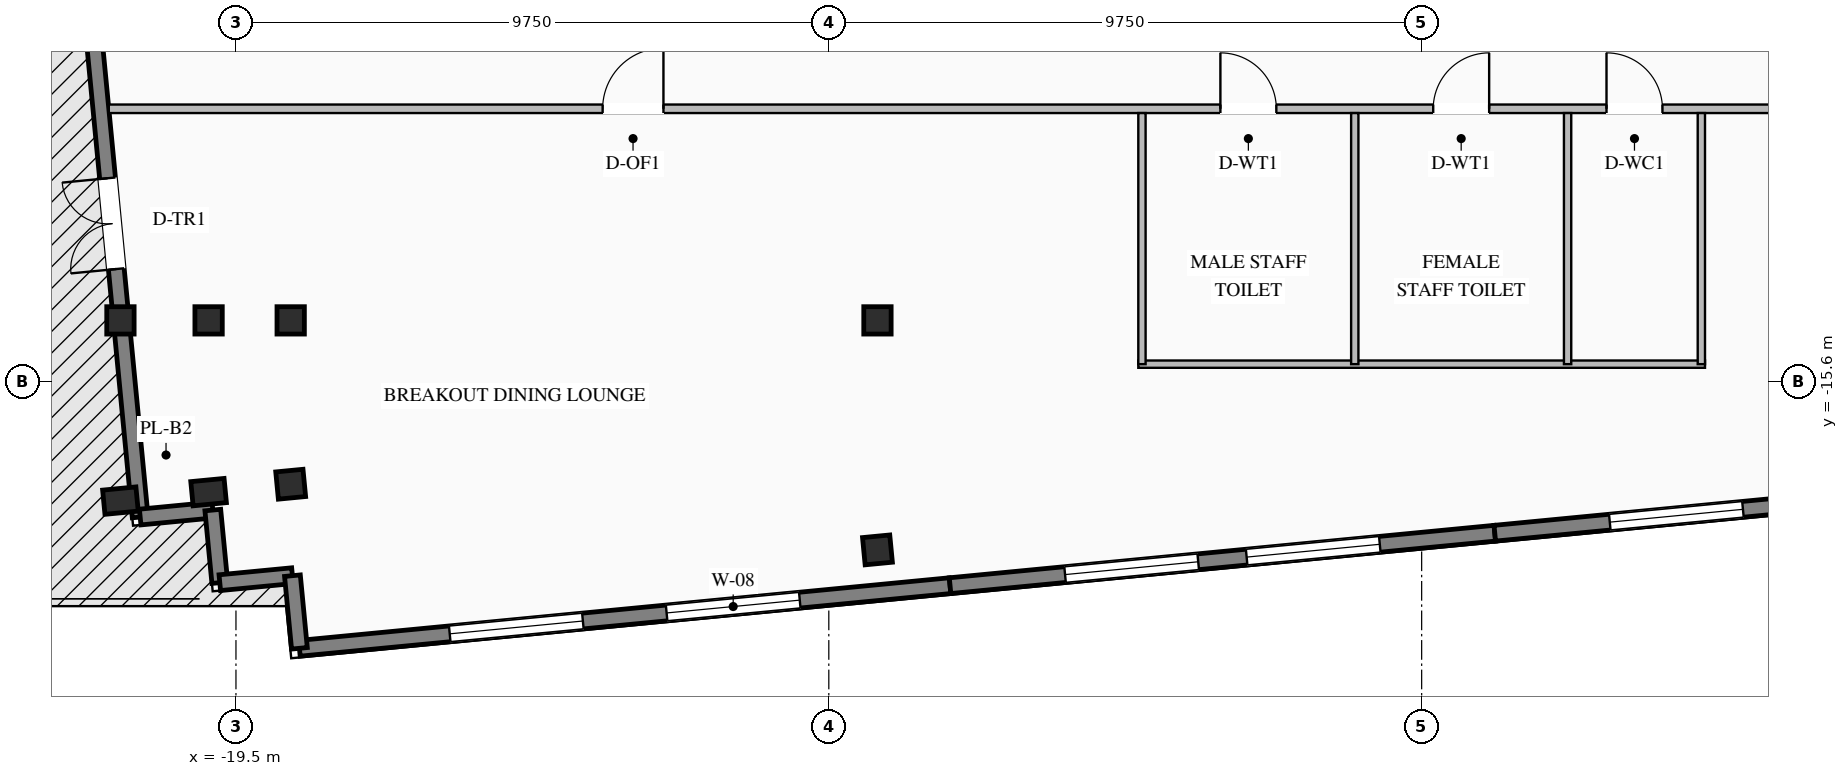
"""IFC4 building model, lengths in metres.
Left out: names, types, materials, properties, quantities, classifications, styles, units other than length and angle.
Written with IfcOpenShell. Run it as: python <this file> out.ifc"""

import sys

from ifc_helpers import new_model, si_unit, direction, frame, frame_2d, origin, origin_2d, place, context, subcontext, project, spatial, rectangle, i_section, extrude, element, fill, save


model = new_model("IFC4")
c1 = context("Model", 3, precision=1e-05, world=origin(), true_north=direction((0.0, 1.0)))
c2 = subcontext(c1, "Body", "Model", "MODEL_VIEW")
j1 = project(units=[si_unit("LENGTHUNIT", "METRE"), si_unit("PLANEANGLEUNIT", "RADIAN")], contexts=[c1])
p1 = place(None, origin())
s1 = spatial("IfcSite", under=j1, at=p1, CompositionType="ELEMENT")
p2 = place(p1, origin())
s2 = spatial("IfcBuilding", under=s1, at=p2, CompositionType="ELEMENT")
p3 = place(p2, frame((0.0, 0.0, 247.5)))
s3 = spatial("IfcBuildingStorey", under=s2, at=p3, CompositionType="ELEMENT", Elevation=247.5)
for number, where, z_axis, x_axis in (
    (1, (-21.4, -14.6, 0.0), (0.0, 0.0, 1.0), (1.0, 0.0, 0.0)),
    (2, (-19.95, -14.6, 0.0), (0.0, 0.0, 1.0), (1.0, 0.0, 0.0)),
    (3, (-18.6, -14.6, 0.0), (0.0, 0.0, 1.0), (1.0, 0.0, 0.0)),
    (4, (-8.95, -14.6, 0.0), (0.0, 0.0, 1.0), (1.0, 0.0, 0.0)),
):
    element("IfcColumn", number, at=place(p3, frame(where, z_axis=z_axis, x_axis=x_axis)), inside=s3, PredefinedType="COLUMN", context=c2, shape_type="SweptSolid", body=[
        extrude(i_section(OverallWidth=0.45, OverallDepth=0.45, WebThickness=0.022, FlangeThickness=0.032, at=origin_2d()), origin(), (0.0, 0.0, 1.0), 4.2),
    ])
p4 = place(p3, frame((-18.6, -17.295, -0.28), z_axis=(0.0, 0.0, 1.0), x_axis=(0.995396198367, 0.09584575252, 0.0)))
e5 = element("IfcColumn", 5, at=p4, inside=s3, PredefinedType="COLUMN", context=c2, shape_type="SweptSolid", body=[
    extrude(i_section(OverallWidth=0.45, OverallDepth=0.45, WebThickness=0.022, FlangeThickness=0.032, at=origin_2d()), origin(), (0.0, 0.0, 1.0), 4.48),
])
p5 = place(p3, frame((-8.95, -18.375, 0.0), z_axis=(0.0, 0.0, 1.0), x_axis=(0.995396198367, 0.09584575252, 0.0)))
e6 = element("IfcColumn", 6, at=p5, inside=s3, PredefinedType="COLUMN", context=c2, shape_type="SweptSolid", body=[
    extrude(i_section(OverallWidth=0.45, OverallDepth=0.45, WebThickness=0.022, FlangeThickness=0.032, at=origin_2d()), origin(), (0.0, 0.0, 1.0), 4.2),
])
for number, where, z_axis, x_axis in (
    (7, (-21.4, -17.564, 0.0), (0.0, 0.0, 1.0), (0.995, 0.096, 0.0)),
    (8, (-19.95, -17.425, 0.0), (0.0, 0.0, 1.0), (0.995, 0.096, 0.0)),
):
    element("IfcColumn", number, at=place(p3, frame(where, z_axis=z_axis, x_axis=x_axis)), inside=s3, PredefinedType="PILASTER", context=c2, shape_type="SweptSolid", body=[
        extrude(rectangle(XDim=0.55, YDim=0.4, at=origin_2d()), origin(), (0.0, 0.0, 1.0), 4.2),
    ])
p6 = place(p3, frame((-7.756, -18.963, 0.0), z_axis=(0.0, 0.0, 1.0), x_axis=(-0.995396745868, -0.095840066339, 0.0)))
e9 = element("IfcWall", 9, at=p6, inside=s3, PredefinedType="STANDARD", context=c2, shape_type="SweptSolid", body=[
    extrude(rectangle(XDim=10.75, YDim=0.26, at=frame_2d((5.375, 0.0))), origin(), (0.0, 0.0, 1.0), 4.0),
])
p7 = place(p6, frame((2.483, 0.0, 0.76)))
e10 = element("IfcOpeningElement", 10, at=p7, cuts=e9, PredefinedType="OPENING", context=c2, shape_type="SweptSolid", body=[
    extrude(rectangle(XDim=2.2, YDim=2.25, at=frame_2d((1.1, 1.125))), frame((0.0, 0.14, 0.0), z_axis=(0.0, -1.0, 0.0), x_axis=(1.0, 0.0, 0.0)), (0.0, 0.0, 1.0), 0.28),
])
p8 = place(p6, frame((6.067, 0.0, 0.76)))
e11 = element("IfcOpeningElement", 11, at=p8, cuts=e9, PredefinedType="OPENING", context=c2, shape_type="SweptSolid", body=[
    extrude(rectangle(XDim=2.2, YDim=2.25, at=frame_2d((1.1, 1.125))), frame((0.0, 0.14, 0.0), z_axis=(0.0, -1.0, 0.0), x_axis=(1.0, 0.0, 0.0)), (0.0, 0.0, 1.0), 0.28),
])
p9 = place(p3, frame((1.203, -18.101, 0.0), z_axis=(0.0, 0.0, 1.0), x_axis=(-0.995397043619, -0.095836973841, 0.0)))
e12 = element("IfcWall", 12, at=p9, inside=s3, PredefinedType="STANDARD", context=c2, shape_type="SweptSolid", body=[
    extrude(rectangle(XDim=9.0, YDim=0.26, at=frame_2d((4.5, 0.0))), origin(), (0.0, 0.0, 1.0), 4.0),
])
p10 = place(p9, frame((1.9, 0.0, 0.76)))
e13 = element("IfcOpeningElement", 13, at=p10, cuts=e12, PredefinedType="OPENING", context=c2, shape_type="SweptSolid", body=[
    extrude(rectangle(XDim=2.2, YDim=2.25, at=frame_2d((1.1, 1.125))), frame((0.0, 0.14, 0.0), z_axis=(0.0, -1.0, 0.0), x_axis=(1.0, 0.0, 0.0)), (0.0, 0.0, 1.0), 0.28),
])
p11 = place(p9, frame((4.9, 0.0, 0.76)))
e14 = element("IfcOpeningElement", 14, at=p11, cuts=e12, PredefinedType="OPENING", context=c2, shape_type="SweptSolid", body=[
    extrude(rectangle(XDim=2.2, YDim=2.25, at=frame_2d((1.1, 1.125))), frame((0.0, 0.14, 0.0), z_axis=(0.0, -1.0, 0.0), x_axis=(1.0, 0.0, 0.0)), (0.0, 0.0, 1.0), 0.28),
])
p12 = place(p3, frame((10.161, -17.238, 0.0), z_axis=(0.0, 0.0, 1.0), x_axis=(-0.995394206237, -0.095866439332, 0.0)))
e15 = element("IfcWall", 15, at=p12, inside=s3, PredefinedType="STANDARD", context=c2, shape_type="SweptSolid", body=[
    extrude(rectangle(XDim=9.0, YDim=0.26, at=frame_2d((4.5, 0.0))), origin(), (0.0, 0.0, 1.0), 4.0),
])
p13 = place(p12, frame((1.9, 0.0, 0.76)))
e16 = element("IfcOpeningElement", 16, at=p13, cuts=e15, PredefinedType="OPENING", context=c2, shape_type="SweptSolid", body=[
    extrude(rectangle(XDim=2.2, YDim=2.25, at=frame_2d((1.1, 1.125))), frame((0.0, 0.14, 0.0), z_axis=(0.0, -1.0, 0.0), x_axis=(1.0, 0.0, 0.0)), (0.0, 0.0, 1.0), 0.28),
])
p14 = place(p12, frame((4.9, 0.0, 0.76)))
e17 = element("IfcOpeningElement", 17, at=p14, cuts=e15, PredefinedType="OPENING", context=c2, shape_type="SweptSolid", body=[
    extrude(rectangle(XDim=2.2, YDim=2.25, at=frame_2d((1.1, 1.125))), frame((0.0, 0.14, 0.0), z_axis=(0.0, -1.0, 0.0), x_axis=(1.0, 0.0, 0.0)), (0.0, 0.0, 1.0), 0.28),
])
p15 = place(p3, frame((-21.075, -17.834, 0.0), z_axis=(0.0, 0.0, 1.0), x_axis=(-0.095852427869, 0.995395555582, 0.0)))
e18 = element("IfcWall", 18, at=p15, inside=s3, PredefinedType="STANDARD", context=c2, shape_type="SweptSolid", body=[
    extrude(rectangle(XDim=15.15, YDim=0.26, at=frame_2d((7.575, 0.0))), origin(), (0.0, 0.0, 1.0), 2.795),
])
p16 = place(p15, frame((4.098, 0.0, 0.0)))
e19 = element("IfcOpeningElement", 19, at=p16, cuts=e18, PredefinedType="OPENING", context=c2, shape_type="SweptSolid", body=[
    extrude(rectangle(XDim=1.5, YDim=2.15, at=frame_2d((0.75, 1.075))), frame((0.0, 0.14, 0.0), z_axis=(0.0, -1.0, 0.0), x_axis=(1.0, 0.0, 0.0)), (0.0, 0.0, 1.0), 0.28),
])
p17 = place(p3, frame((-21.075, -17.834, 0.0), z_axis=(0.0, 0.0, 1.0), x_axis=(0.995397091755, 0.095836473879, 0.0)))
e20 = element("IfcWall", 20, at=p17, inside=s3, PredefinedType="STANDARD", context=c2, shape_type="SweptSolid", body=[
    extrude(rectangle(XDim=1.2, YDim=0.26, at=frame_2d((0.6, 0.0))), origin(), (0.0, 0.0, 1.0), 2.795),
])
for number, where, z_axis, x_axis in (
    (21, (-19.881, -17.719, 0.0), (0.0, 0.0, 1.0), (0.096, -0.995, 0.0)),
    (22, (-19.766, -18.914, 0.0), (0.0, 0.0, 1.0), (0.995, 0.096, 0.0)),
):
    element("IfcWall", number, at=place(p3, frame(where, z_axis=z_axis, x_axis=x_axis)), inside=s3, PredefinedType="STANDARD", context=c2, shape_type="SweptSolid", body=[
        extrude(rectangle(XDim=1.2, YDim=0.26, at=frame_2d((0.6, 0.0))), origin(), (0.0, 0.0, 1.0), 2.795),
    ])
p18 = place(p3, frame((-18.571, -18.799, 0.0), z_axis=(0.0, 0.0, 1.0), x_axis=(0.095836473879, -0.995397091755, 0.0)))
e23 = element("IfcWall", 23, at=p18, inside=s3, PredefinedType="STANDARD", context=c2, shape_type="SweptSolid", body=[
    extrude(rectangle(XDim=1.2, YDim=0.26, at=frame_2d((0.6, 0.0))), origin(), (0.0, 0.0, 1.0), 2.795),
])
p19 = place(p3, frame((-21.591, -11.12, 0.0), z_axis=(0.0, 0.0, 1.0), x_axis=(1.0, 0.0, 0.0)))
e24 = element("IfcWall", 24, at=p19, inside=s3, PredefinedType="STANDARD", context=c2, shape_type="SweptSolid", body=[
    extrude(rectangle(XDim=53.285, YDim=0.14, at=frame_2d((26.643, 0.0))), origin(), (0.0, 0.0, 1.0), 4.0),
])
p20 = place(p19, frame((18.281, 0.0, 0.0)))
e25 = element("IfcOpeningElement", 25, at=p20, cuts=e24, PredefinedType="OPENING", context=c2, shape_type="SweptSolid", body=[
    extrude(rectangle(XDim=0.92, YDim=2.08, at=frame_2d((0.46, 1.04))), frame((0.0, 0.08, 0.0), z_axis=(0.0, -1.0, 0.0), x_axis=(1.0, 0.0, 0.0)), (0.0, 0.0, 1.0), 0.16),
])
p21 = place(p19, frame((21.781, 0.0, 0.0)))
e26 = element("IfcOpeningElement", 26, at=p21, cuts=e24, PredefinedType="OPENING", context=c2, shape_type="SweptSolid", body=[
    extrude(rectangle(XDim=0.92, YDim=2.08, at=frame_2d((0.46, 1.04))), frame((0.0, 0.08, 0.0), z_axis=(0.0, -1.0, 0.0), x_axis=(1.0, 0.0, 0.0)), (0.0, 0.0, 1.0), 0.16),
])
p22 = place(p19, frame((24.631, 0.0, 0.0)))
e27 = element("IfcOpeningElement", 27, at=p22, cuts=e24, PredefinedType="OPENING", context=c2, shape_type="SweptSolid", body=[
    extrude(rectangle(XDim=0.92, YDim=2.08, at=frame_2d((0.46, 1.04))), frame((0.0, 0.08, 0.0), z_axis=(0.0, -1.0, 0.0), x_axis=(1.0, 0.0, 0.0)), (0.0, 0.0, 1.0), 0.16),
])
p23 = place(p19, frame((8.122, 0.0, 0.0)))
e28 = element("IfcOpeningElement", 28, at=p23, cuts=e24, PredefinedType="OPENING", context=c2, shape_type="SweptSolid", body=[
    extrude(rectangle(XDim=1.0, YDim=2.08, at=frame_2d((0.5, 1.04))), frame((0.0, 0.08, 0.0), z_axis=(0.0, -1.0, 0.0), x_axis=(1.0, 0.0, 0.0)), (0.0, 0.0, 1.0), 0.16),
])
p24 = place(p19, frame((39.112, 0.0, 0.0)))
e29 = element("IfcOpeningElement", 29, at=p24, cuts=e24, PredefinedType="OPENING", context=c2, shape_type="SweptSolid", body=[
    extrude(rectangle(XDim=1.0, YDim=2.08, at=frame_2d((0.5, 1.04))), frame((0.0, 0.08, 0.0), z_axis=(0.0, -1.0, 0.0), x_axis=(1.0, 0.0, 0.0)), (0.0, 0.0, 1.0), 0.16),
])
p25 = place(p3, frame((-4.66, -15.32, 0.0), z_axis=(0.0, 0.0, 1.0), x_axis=(1.0, 0.0, 0.0)))
e30 = element("IfcWall", 30, at=p25, inside=s3, PredefinedType="STANDARD", context=c2, shape_type="SweptSolid", body=[
    extrude(rectangle(XDim=9.32, YDim=0.12, at=frame_2d((4.66, 0.0))), origin(), (0.0, 0.0, 1.0), 4.0),
])
for number, where, z_axis, x_axis in (
    (31, (-4.6, -15.32, 0.0), (0.0, 0.0, 1.0), (0.0, 1.0, 0.0)),
    (32, (-1.1, -15.32, 0.0), (0.0, 0.0, 1.0), (0.0, 1.0, 0.0)),
    (33, (2.4, -15.32, 0.0), (0.0, 0.0, 1.0), (0.0, 1.0, 0.0)),
    (34, (4.6, -15.32, 0.0), (0.0, 0.0, 1.0), (0.0, 1.0, 0.0)),
):
    element("IfcWall", number, at=place(p3, frame(where, z_axis=z_axis, x_axis=x_axis)), inside=s3, PredefinedType="STANDARD", context=c2, shape_type="SweptSolid", body=[
        extrude(rectangle(XDim=4.13, YDim=0.12, at=frame_2d((2.065, 0.0))), origin(), (0.0, 0.0, 1.0), 4.0),
    ])
p26 = place(p7, origin())
e35 = element("IfcWindow", 35, at=p26, inside=s3, PartitioningType="DOUBLE_PANEL_VERTICAL", PredefinedType="WINDOW", context=c2, shape_type="SweptSolid", body=[
    extrude(rectangle(XDim=2.2, YDim=2.25, at=frame_2d((1.1, 1.125))), frame((0.0, 0.03, 0.0), z_axis=(0.0, -1.0, 0.0), x_axis=(1.0, 0.0, 0.0)), (0.0, 0.0, 1.0), 0.06),
])
fill(e10, e35)
p27 = place(p8, origin())
e36 = element("IfcWindow", 36, at=p27, inside=s3, PartitioningType="DOUBLE_PANEL_VERTICAL", PredefinedType="WINDOW", context=c2, shape_type="SweptSolid", body=[
    extrude(rectangle(XDim=2.2, YDim=2.25, at=frame_2d((1.1, 1.125))), frame((0.0, 0.03, 0.0), z_axis=(0.0, -1.0, 0.0), x_axis=(1.0, 0.0, 0.0)), (0.0, 0.0, 1.0), 0.06),
])
fill(e11, e36)
p28 = place(p10, origin())
e37 = element("IfcWindow", 37, at=p28, inside=s3, PartitioningType="DOUBLE_PANEL_VERTICAL", PredefinedType="WINDOW", context=c2, shape_type="SweptSolid", body=[
    extrude(rectangle(XDim=2.2, YDim=2.25, at=frame_2d((1.1, 1.125))), frame((0.0, 0.03, 0.0), z_axis=(0.0, -1.0, 0.0), x_axis=(1.0, 0.0, 0.0)), (0.0, 0.0, 1.0), 0.06),
])
fill(e13, e37)
p29 = place(p11, origin())
e38 = element("IfcWindow", 38, at=p29, inside=s3, PartitioningType="DOUBLE_PANEL_VERTICAL", PredefinedType="WINDOW", context=c2, shape_type="SweptSolid", body=[
    extrude(rectangle(XDim=2.2, YDim=2.25, at=frame_2d((1.1, 1.125))), frame((0.0, 0.03, 0.0), z_axis=(0.0, -1.0, 0.0), x_axis=(1.0, 0.0, 0.0)), (0.0, 0.0, 1.0), 0.06),
])
fill(e14, e38)
p30 = place(p14, origin())
e39 = element("IfcWindow", 39, at=p30, inside=s3, PartitioningType="DOUBLE_PANEL_VERTICAL", PredefinedType="WINDOW", context=c2, shape_type="SweptSolid", body=[
    extrude(rectangle(XDim=2.2, YDim=2.25, at=frame_2d((1.1, 1.125))), frame((0.0, 0.03, 0.0), z_axis=(0.0, -1.0, 0.0), x_axis=(1.0, 0.0, 0.0)), (0.0, 0.0, 1.0), 0.06),
])
fill(e17, e39)
p31 = place(p16, origin())
e40 = element("IfcDoor", 40, at=p31, inside=s3, OperationType="DOUBLE_DOOR_SINGLE_SWING", PredefinedType="DOOR", context=c2, shape_type="SweptSolid", body=[
    extrude(rectangle(XDim=1.5, YDim=2.15, at=frame_2d((0.75, 1.075))), frame((0.0, 0.025, 0.0), z_axis=(0.0, -1.0, 0.0), x_axis=(1.0, 0.0, 0.0)), (0.0, 0.0, 1.0), 0.05),
])
fill(e19, e40)
p32 = place(p20, origin())
e41 = element("IfcDoor", 41, at=p32, inside=s3, OperationType="SINGLE_SWING_LEFT", PredefinedType="DOOR", context=c2, shape_type="SweptSolid", body=[
    extrude(rectangle(XDim=0.92, YDim=2.08, at=frame_2d((0.46, 1.04))), frame((0.0, 0.025, 0.0), z_axis=(0.0, -1.0, 0.0), x_axis=(1.0, 0.0, 0.0)), (0.0, 0.0, 1.0), 0.05),
])
fill(e25, e41)
p33 = place(p21, origin())
e42 = element("IfcDoor", 42, at=p33, inside=s3, OperationType="SINGLE_SWING_RIGHT", PredefinedType="DOOR", context=c2, shape_type="SweptSolid", body=[
    extrude(rectangle(XDim=0.92, YDim=2.08, at=frame_2d((0.46, 1.04))), frame((0.0, 0.025, 0.0), z_axis=(0.0, -1.0, 0.0), x_axis=(1.0, 0.0, 0.0)), (0.0, 0.0, 1.0), 0.05),
])
fill(e26, e42)
p34 = place(p22, origin())
e43 = element("IfcDoor", 43, at=p34, inside=s3, OperationType="SINGLE_SWING_LEFT", PredefinedType="DOOR", context=c2, shape_type="SweptSolid", body=[
    extrude(rectangle(XDim=0.92, YDim=2.08, at=frame_2d((0.46, 1.04))), frame((0.0, 0.025, 0.0), z_axis=(0.0, -1.0, 0.0), x_axis=(1.0, 0.0, 0.0)), (0.0, 0.0, 1.0), 0.05),
])
fill(e27, e43)
p35 = place(p23, origin())
e44 = element("IfcDoor", 44, at=p35, inside=s3, OperationType="SINGLE_SWING_RIGHT", PredefinedType="DOOR", context=c2, shape_type="SweptSolid", body=[
    extrude(rectangle(XDim=1.0, YDim=2.08, at=frame_2d((0.5, 1.04))), frame((0.0, 0.025, 0.0), z_axis=(0.0, -1.0, 0.0), x_axis=(1.0, 0.0, 0.0)), (0.0, 0.0, 1.0), 0.05),
])
fill(e28, e44)
save(model, sys.argv[1])
